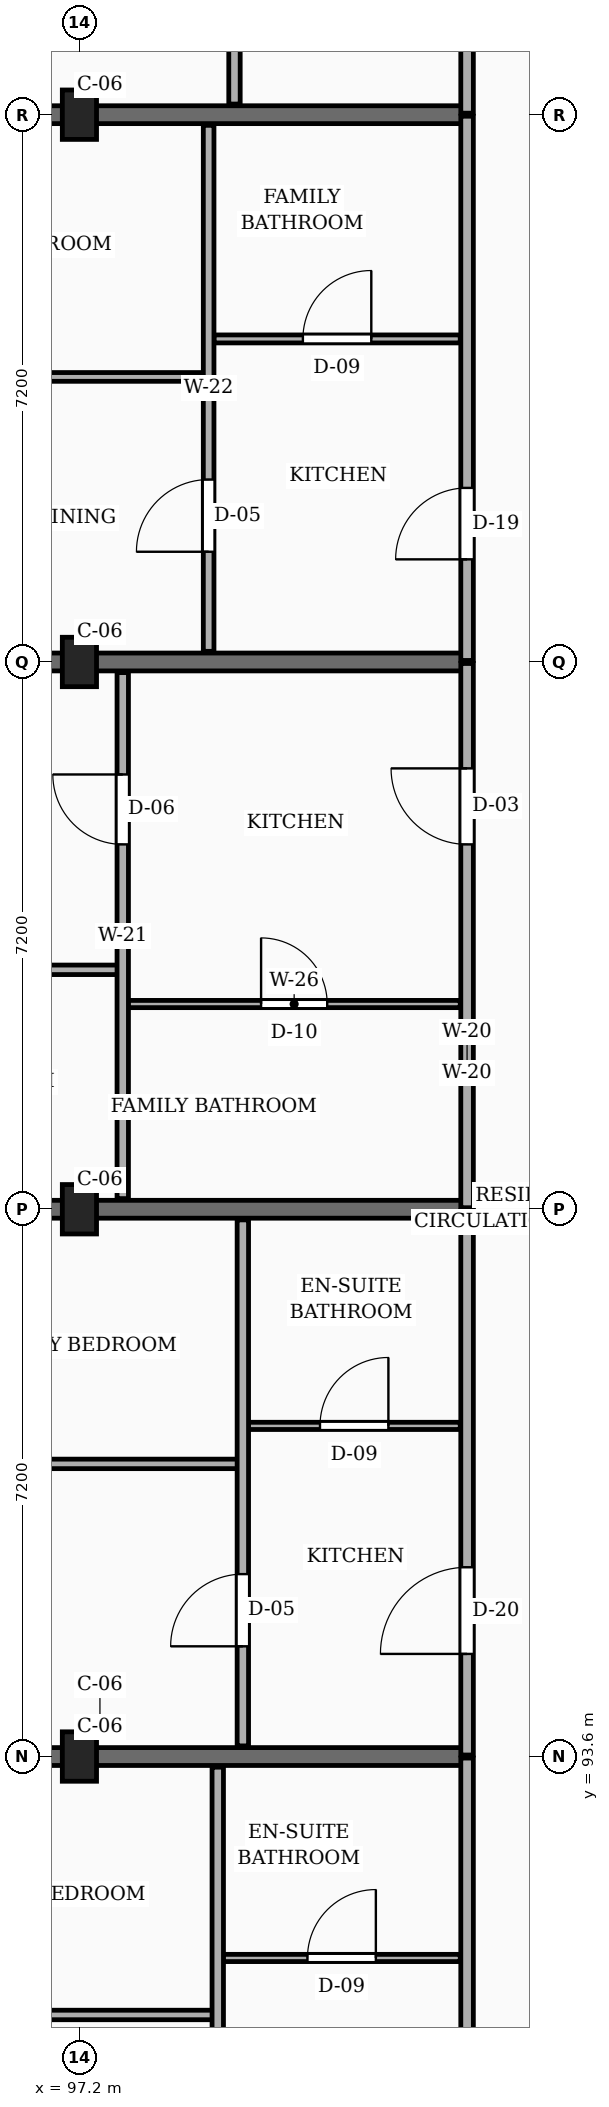
"""IFC4 building model, lengths in metres.
Left out: names, types, materials, properties, quantities, classifications, styles, units other than length and angle.
Written with IfcOpenShell. Run it as: python <this file> out.ifc"""

import sys

from ifc_helpers import new_model, si_unit, direction, frame, frame_2d, origin, origin_2d, place, context, subcontext, project, spatial, rectangle, extrude, element, fill, save


model = new_model("IFC4")
c1 = context("Model", 3, precision=1e-05, world=origin(), true_north=direction((0.0, 1.0)))
c2 = subcontext(c1, "Body", "Model", "MODEL_VIEW")
j1 = project(units=[si_unit("LENGTHUNIT", "METRE"), si_unit("PLANEANGLEUNIT", "RADIAN")], contexts=[c1])
p1 = place(None, origin())
s1 = spatial("IfcSite", under=j1, at=p1, CompositionType="ELEMENT")
p2 = place(p1, origin())
s2 = spatial("IfcBuilding", under=s1, at=p2, CompositionType="ELEMENT")
p3 = place(p2, frame((0.0, 0.0, 13.95)))
s3 = spatial("IfcBuildingStorey", under=s2, at=p3, CompositionType="ELEMENT", Elevation=13.95)
for number, where, z_axis, x_axis in (
    (1, (97.2, 93.6, 0.0), (0.0, 0.0, 1.0), (1.0, 0.0, 0.0)),
    (2, (97.2, 100.8, 0.0), (0.0, 0.0, 1.0), (1.0, 0.0, 0.0)),
    (3, (97.2, 108.0, 0.0), (0.0, 0.0, 1.0), (1.0, 0.0, 0.0)),
    (4, (97.2, 115.2, 0.0), (0.0, 0.0, 1.0), (1.0, 0.0, 0.0)),
):
    element("IfcColumn", number, at=place(p3, frame(where, z_axis=z_axis, x_axis=x_axis)), inside=s3, PredefinedType="COLUMN", context=c2, shape_type="SweptSolid", body=[
        extrude(rectangle(XDim=0.45, YDim=0.65, at=origin_2d()), origin(), (0.0, 0.0, 1.0), 3.15),
    ])
for number, where, z_axis, x_axis in (
    (5, (90.275, 93.6, 0.0), (0.0, 0.0, 1.0), (1.0, 0.0, 0.0)),
    (6, (90.275, 100.8, 0.0), (0.0, 0.0, 1.0), (1.0, 0.0, 0.0)),
    (7, (90.275, 108.0, 0.0), (0.0, 0.0, 1.0), (1.0, 0.0, 0.0)),
    (8, (90.275, 115.2, 0.0), (0.0, 0.0, 1.0), (1.0, 0.0, 0.0)),
):
    element("IfcWall", number, at=place(p3, frame(where, z_axis=z_axis, x_axis=x_axis)), inside=s3, PredefinedType="SOLIDWALL", context=c2, shape_type="SweptSolid", body=[
        extrude(rectangle(XDim=12.025, YDim=0.235, at=frame_2d((6.013, 0.0))), origin(), (0.0, 0.0, 1.0), 2.19),
    ])
p4 = place(p3, frame((102.3, 86.575, 0.0), z_axis=(0.0, 0.0, 1.0), x_axis=(0.0, 1.0, 0.0)))
e9 = element("IfcWall", 9, at=p4, inside=s3, PredefinedType="PARTITIONING", context=c2, shape_type="SweptSolid", body=[
    extrude(rectangle(XDim=7.005, YDim=0.165, at=frame_2d((3.502, 0.0))), origin(), (0.0, 0.0, 1.0), 2.325),
])
p5 = place(p4, frame((1.175, 0.0, 0.0)))
e10 = element("IfcOpeningElement", 10, at=p5, cuts=e9, PredefinedType="OPENING", context=c2, shape_type="SweptSolid", body=[
    extrude(rectangle(XDim=0.94, YDim=2.12, at=frame_2d((0.47, 1.06))), frame((0.0, 0.093, 0.0), z_axis=(0.0, -1.0, 0.0), x_axis=(1.0, 0.0, 0.0)), (0.0, 0.0, 1.0), 0.185),
])
p6 = place(p3, frame((102.3, 93.62, 0.0), z_axis=(0.0, 0.0, 1.0), x_axis=(0.0, 1.0, 0.0)))
e11 = element("IfcWall", 11, at=p6, inside=s3, PredefinedType="PARTITIONING", context=c2, shape_type="SweptSolid", body=[
    extrude(rectangle(XDim=7.16, YDim=0.165, at=frame_2d((3.58, 0.0))), origin(), (0.0, 0.0, 1.0), 2.325),
])
p7 = place(p6, frame((1.33, 0.0, 0.0)))
e12 = element("IfcOpeningElement", 12, at=p7, cuts=e11, PredefinedType="OPENING", context=c2, shape_type="SweptSolid", body=[
    extrude(rectangle(XDim=1.14, YDim=2.18, at=frame_2d((0.57, 1.09))), frame((0.0, 0.093, 0.0), z_axis=(0.0, -1.0, 0.0), x_axis=(1.0, 0.0, 0.0)), (0.0, 0.0, 1.0), 0.185),
])
p8 = place(p3, frame((102.3, 100.82, 0.0), z_axis=(0.0, 0.0, 1.0), x_axis=(0.0, 1.0, 0.0)))
e13 = element("IfcWall", 13, at=p8, inside=s3, PredefinedType="PARTITIONING", context=c2, shape_type="SweptSolid", body=[
    extrude(rectangle(XDim=7.16, YDim=0.165, at=frame_2d((3.58, 0.0))), origin(), (0.0, 0.0, 1.0), 2.325),
])
p9 = place(p8, frame((4.78, 0.0, 0.0)))
e14 = element("IfcOpeningElement", 14, at=p9, cuts=e13, PredefinedType="OPENING", context=c2, shape_type="SweptSolid", body=[
    extrude(rectangle(XDim=1.0, YDim=2.15, at=frame_2d((0.5, 1.075))), frame((0.0, 0.093, 0.0), z_axis=(0.0, -1.0, 0.0), x_axis=(1.0, 0.0, 0.0)), (0.0, 0.0, 1.0), 0.185),
])
p10 = place(p3, frame((102.3, 108.02, 0.0), z_axis=(0.0, 0.0, 1.0), x_axis=(0.0, 1.0, 0.0)))
e15 = element("IfcWall", 15, at=p10, inside=s3, PredefinedType="PARTITIONING", context=c2, shape_type="SweptSolid", body=[
    extrude(rectangle(XDim=7.16, YDim=0.165, at=frame_2d((3.58, 0.0))), origin(), (0.0, 0.0, 1.0), 2.325),
])
p11 = place(p10, frame((1.33, 0.0, 0.0)))
e16 = element("IfcOpeningElement", 16, at=p11, cuts=e15, PredefinedType="OPENING", context=c2, shape_type="SweptSolid", body=[
    extrude(rectangle(XDim=0.94, YDim=2.12, at=frame_2d((0.47, 1.06))), frame((0.0, 0.093, 0.0), z_axis=(0.0, -1.0, 0.0), x_axis=(1.0, 0.0, 0.0)), (0.0, 0.0, 1.0), 0.185),
])
p12 = place(p3, frame((102.3, 115.22, 0.0), z_axis=(0.0, 0.0, 1.0), x_axis=(0.0, 1.0, 0.0)))
e17 = element("IfcWall", 17, at=p12, inside=s3, PredefinedType="PARTITIONING", context=c2, shape_type="SweptSolid", body=[
    extrude(rectangle(XDim=7.16, YDim=0.165, at=frame_2d((3.58, 0.0))), origin(), (0.0, 0.0, 1.0), 2.325),
])
p13 = place(p12, frame((1.33, 0.0, 0.0)))
e18 = element("IfcOpeningElement", 18, at=p13, cuts=e17, PredefinedType="OPENING", context=c2, shape_type="SweptSolid", body=[
    extrude(rectangle(XDim=1.14, YDim=2.18, at=frame_2d((0.57, 1.09))), frame((0.0, 0.093, 0.0), z_axis=(0.0, -1.0, 0.0), x_axis=(1.0, 0.0, 0.0)), (0.0, 0.0, 1.0), 0.185),
])
p14 = place(p3, frame((90.175, 90.2, 0.0), z_axis=(0.0, 0.0, 1.0), x_axis=(1.0, 0.0, 0.0)))
e19 = element("IfcWall", 19, at=p14, inside=s3, PredefinedType="PARTITIONING", context=c2, shape_type="SweptSolid", body=[
    extrude(rectangle(XDim=8.775, YDim=0.125, at=frame_2d((4.387, 0.0))), origin(), (0.0, 0.0, 1.0), 2.325),
])
p15 = place(p14, frame((3.938, 0.0, 0.0)))
e20 = element("IfcOpeningElement", 20, at=p15, cuts=e19, PredefinedType="OPENING", context=c2, shape_type="SweptSolid", body=[
    extrude(rectangle(XDim=0.9, YDim=2.1, at=frame_2d((0.45, 1.05))), frame((0.0, 0.073, 0.0), z_axis=(0.0, -1.0, 0.0), x_axis=(1.0, 0.0, 0.0)), (0.0, 0.0, 1.0), 0.145),
])
p16 = place(p3, frame((99.09, 90.95, 0.0), z_axis=(0.0, 0.0, 1.0), x_axis=(1.0, 0.0, 0.0)))
e21 = element("IfcWall", 21, at=p16, inside=s3, PredefinedType="PARTITIONING", context=c2, shape_type="SweptSolid", body=[
    extrude(rectangle(XDim=3.12, YDim=0.095, at=frame_2d((1.56, 0.0))), origin(), (0.0, 0.0, 1.0), 2.325),
])
p17 = place(p16, frame((1.11, 0.0, 0.0)))
e22 = element("IfcOpeningElement", 22, at=p17, cuts=e21, PredefinedType="OPENING", context=c2, shape_type="SweptSolid", body=[
    extrude(rectangle(XDim=0.9, YDim=2.05, at=frame_2d((0.45, 1.025))), frame((0.0, 0.058, 0.0), z_axis=(0.0, -1.0, 0.0), x_axis=(1.0, 0.0, 0.0)), (0.0, 0.0, 1.0), 0.115),
])
p18 = place(p3, frame((99.02, 86.575, 0.0), z_axis=(0.0, 0.0, 1.0), x_axis=(0.0, 1.0, 0.0)))
e23 = element("IfcWall", 23, at=p18, inside=s3, PredefinedType="PARTITIONING", context=c2, shape_type="SweptSolid", body=[
    extrude(rectangle(XDim=6.885, YDim=0.15, at=frame_2d((3.442, 0.0))), origin(), (0.0, 0.0, 1.0), 2.325),
])
p19 = place(p18, frame((1.275, 0.0, 0.0)))
e24 = element("IfcOpeningElement", 24, at=p19, cuts=e23, PredefinedType="OPENING", context=c2, shape_type="SweptSolid", body=[
    extrude(rectangle(XDim=0.95, YDim=2.1, at=frame_2d((0.475, 1.05))), frame((0.0, 0.085, 0.0), z_axis=(0.0, -1.0, 0.0), x_axis=(1.0, 0.0, 0.0)), (0.0, 0.0, 1.0), 0.17),
])
p20 = place(p3, frame((90.175, 97.45, 0.0), z_axis=(0.0, 0.0, 1.0), x_axis=(1.0, 0.0, 0.0)))
e25 = element("IfcWall", 25, at=p20, inside=s3, PredefinedType="PARTITIONING", context=c2, shape_type="SweptSolid", body=[
    extrude(rectangle(XDim=9.105, YDim=0.125, at=frame_2d((4.552, 0.0))), origin(), (0.0, 0.0, 1.0), 2.325),
])
p21 = place(p20, frame((4.103, 0.0, 0.0)))
e26 = element("IfcOpeningElement", 26, at=p21, cuts=e25, PredefinedType="OPENING", context=c2, shape_type="SweptSolid", body=[
    extrude(rectangle(XDim=0.9, YDim=2.1, at=frame_2d((0.45, 1.05))), frame((0.0, 0.073, 0.0), z_axis=(0.0, -1.0, 0.0), x_axis=(1.0, 0.0, 0.0)), (0.0, 0.0, 1.0), 0.145),
])
p22 = place(p3, frame((99.42, 97.95, 0.0), z_axis=(0.0, 0.0, 1.0), x_axis=(1.0, 0.0, 0.0)))
e27 = element("IfcWall", 27, at=p22, inside=s3, PredefinedType="PARTITIONING", context=c2, shape_type="SweptSolid", body=[
    extrude(rectangle(XDim=2.79, YDim=0.095, at=frame_2d((1.395, 0.0))), origin(), (0.0, 0.0, 1.0), 2.325),
])
p23 = place(p22, frame((0.945, 0.0, 0.0)))
e28 = element("IfcOpeningElement", 28, at=p23, cuts=e27, PredefinedType="OPENING", context=c2, shape_type="SweptSolid", body=[
    extrude(rectangle(XDim=0.9, YDim=2.05, at=frame_2d((0.45, 1.025))), frame((0.0, 0.058, 0.0), z_axis=(0.0, -1.0, 0.0), x_axis=(1.0, 0.0, 0.0)), (0.0, 0.0, 1.0), 0.115),
])
p24 = place(p3, frame((99.35, 93.74, 0.0), z_axis=(0.0, 0.0, 1.0), x_axis=(0.0, 1.0, 0.0)))
e29 = element("IfcWall", 29, at=p24, inside=s3, PredefinedType="PARTITIONING", context=c2, shape_type="SweptSolid", body=[
    extrude(rectangle(XDim=6.92, YDim=0.15, at=frame_2d((3.46, 0.0))), origin(), (0.0, 0.0, 1.0), 2.325),
])
p25 = place(p24, frame((1.31, 0.0, 0.0)))
e30 = element("IfcOpeningElement", 30, at=p25, cuts=e29, PredefinedType="OPENING", context=c2, shape_type="SweptSolid", body=[
    extrude(rectangle(XDim=0.95, YDim=2.1, at=frame_2d((0.475, 1.05))), frame((0.0, 0.085, 0.0), z_axis=(0.0, -1.0, 0.0), x_axis=(1.0, 0.0, 0.0)), (0.0, 0.0, 1.0), 0.17),
])
p26 = place(p3, frame((90.175, 103.95, 0.0), z_axis=(0.0, 0.0, 1.0), x_axis=(1.0, 0.0, 0.0)))
e31 = element("IfcWall", 31, at=p26, inside=s3, PredefinedType="PARTITIONING", context=c2, shape_type="SweptSolid", body=[
    extrude(rectangle(XDim=7.525, YDim=0.125, at=frame_2d((3.762, 0.0))), origin(), (0.0, 0.0, 1.0), 2.325),
])
p27 = place(p26, frame((3.323, 0.0, 0.0)))
e32 = element("IfcOpeningElement", 32, at=p27, cuts=e31, PredefinedType="OPENING", context=c2, shape_type="SweptSolid", body=[
    extrude(rectangle(XDim=0.88, YDim=2.08, at=frame_2d((0.44, 1.04))), frame((0.0, 0.073, 0.0), z_axis=(0.0, -1.0, 0.0), x_axis=(1.0, 0.0, 0.0)), (0.0, 0.0, 1.0), 0.145),
])
p28 = place(p3, frame((97.84, 103.5, 0.0), z_axis=(0.0, 0.0, 1.0), x_axis=(1.0, 0.0, 0.0)))
e33 = element("IfcWall", 33, at=p28, inside=s3, PredefinedType="PARTITIONING", context=c2, shape_type="SweptSolid", body=[
    extrude(rectangle(XDim=4.37, YDim=0.095, at=frame_2d((2.185, 0.0))), origin(), (0.0, 0.0, 1.0), 2.325),
])
p29 = place(p28, frame((1.75, 0.0, 0.0)))
e34 = element("IfcOpeningElement", 34, at=p29, cuts=e33, PredefinedType="OPENING", context=c2, shape_type="SweptSolid", body=[
    extrude(rectangle(XDim=0.87, YDim=2.05, at=frame_2d((0.435, 1.025))), frame((0.0, 0.058, 0.0), z_axis=(0.0, -1.0, 0.0), x_axis=(1.0, 0.0, 0.0)), (0.0, 0.0, 1.0), 0.115),
])
p30 = place(p3, frame((97.77, 100.94, 0.0), z_axis=(0.0, 0.0, 1.0), x_axis=(0.0, 1.0, 0.0)))
e35 = element("IfcWall", 35, at=p30, inside=s3, PredefinedType="PARTITIONING", context=c2, shape_type="SweptSolid", body=[
    extrude(rectangle(XDim=6.92, YDim=0.15, at=frame_2d((3.46, 0.0))), origin(), (0.0, 0.0, 1.0), 2.325),
])
p31 = place(p30, frame((4.66, 0.0, 0.0)))
e36 = element("IfcOpeningElement", 36, at=p31, cuts=e35, PredefinedType="OPENING", context=c2, shape_type="SweptSolid", body=[
    extrude(rectangle(XDim=0.92, YDim=2.1, at=frame_2d((0.46, 1.05))), frame((0.0, 0.085, 0.0), z_axis=(0.0, -1.0, 0.0), x_axis=(1.0, 0.0, 0.0)), (0.0, 0.0, 1.0), 0.17),
])
p32 = place(p3, frame((90.175, 111.75, 0.0), z_axis=(0.0, 0.0, 1.0), x_axis=(1.0, 0.0, 0.0)))
e37 = element("IfcWall", 37, at=p32, inside=s3, PredefinedType="PARTITIONING", context=c2, shape_type="SweptSolid", body=[
    extrude(rectangle(XDim=8.655, YDim=0.115, at=frame_2d((4.328, 0.0))), origin(), (0.0, 0.0, 1.0), 2.325),
])
p33 = place(p32, frame((3.877, 0.0, 0.0)))
e38 = element("IfcOpeningElement", 38, at=p33, cuts=e37, PredefinedType="OPENING", context=c2, shape_type="SweptSolid", body=[
    extrude(rectangle(XDim=0.9, YDim=2.1, at=frame_2d((0.45, 1.05))), frame((0.0, 0.067, 0.0), z_axis=(0.0, -1.0, 0.0), x_axis=(1.0, 0.0, 0.0)), (0.0, 0.0, 1.0), 0.135),
])
p34 = place(p3, frame((98.97, 112.25, 0.0), z_axis=(0.0, 0.0, 1.0), x_axis=(1.0, 0.0, 0.0)))
e39 = element("IfcWall", 39, at=p34, inside=s3, PredefinedType="PARTITIONING", context=c2, shape_type="SweptSolid", body=[
    extrude(rectangle(XDim=3.24, YDim=0.105, at=frame_2d((1.62, 0.0))), origin(), (0.0, 0.0, 1.0), 2.325),
])
p35 = place(p34, frame((1.17, 0.0, 0.0)))
e40 = element("IfcOpeningElement", 40, at=p35, cuts=e39, PredefinedType="OPENING", context=c2, shape_type="SweptSolid", body=[
    extrude(rectangle(XDim=0.9, YDim=2.05, at=frame_2d((0.45, 1.025))), frame((0.0, 0.062, 0.0), z_axis=(0.0, -1.0, 0.0), x_axis=(1.0, 0.0, 0.0)), (0.0, 0.0, 1.0), 0.125),
])
p36 = place(p3, frame((98.9, 108.14, 0.0), z_axis=(0.0, 0.0, 1.0), x_axis=(0.0, 1.0, 0.0)))
e41 = element("IfcWall", 41, at=p36, inside=s3, PredefinedType="PARTITIONING", context=c2, shape_type="SweptSolid", body=[
    extrude(rectangle(XDim=6.92, YDim=0.14, at=frame_2d((3.46, 0.0))), origin(), (0.0, 0.0, 1.0), 2.325),
])
p37 = place(p36, frame((1.31, 0.0, 0.0)))
e42 = element("IfcOpeningElement", 42, at=p37, cuts=e41, PredefinedType="OPENING", context=c2, shape_type="SweptSolid", body=[
    extrude(rectangle(XDim=0.95, YDim=2.1, at=frame_2d((0.475, 1.05))), frame((0.0, 0.08, 0.0), z_axis=(0.0, -1.0, 0.0), x_axis=(1.0, 0.0, 0.0)), (0.0, 0.0, 1.0), 0.16),
])
p38 = place(p3, frame((99.24, 115.34, 0.0), z_axis=(0.0, 0.0, 1.0), x_axis=(0.0, 1.0, 0.0)))
e43 = element("IfcWall", 43, at=p38, inside=s3, PredefinedType="PARTITIONING", context=c2, shape_type="SweptSolid", body=[
    extrude(rectangle(XDim=6.92, YDim=0.15, at=frame_2d((3.46, 0.0))), origin(), (0.0, 0.0, 1.0), 2.325),
])
p39 = place(p38, frame((1.31, 0.0, 0.0)))
e44 = element("IfcOpeningElement", 44, at=p39, cuts=e43, PredefinedType="OPENING", context=c2, shape_type="SweptSolid", body=[
    extrude(rectangle(XDim=0.92, YDim=2.1, at=frame_2d((0.46, 1.05))), frame((0.0, 0.085, 0.0), z_axis=(0.0, -1.0, 0.0), x_axis=(1.0, 0.0, 0.0)), (0.0, 0.0, 1.0), 0.17),
])
p40 = place(p7, origin())
e45 = element("IfcDoor", 45, at=p40, inside=s3, OperationType="SINGLE_SWING_LEFT", PredefinedType="DOOR", context=c2, shape_type="SweptSolid", body=[
    extrude(rectangle(XDim=1.14, YDim=2.18, at=frame_2d((0.57, 1.09))), frame((0.0, 0.025, 0.0), z_axis=(0.0, -1.0, 0.0), x_axis=(1.0, 0.0, 0.0)), (0.0, 0.0, 1.0), 0.05),
])
fill(e12, e45)
p41 = place(p9, origin())
e46 = element("IfcDoor", 46, at=p41, inside=s3, OperationType="SINGLE_SWING_RIGHT", PredefinedType="DOOR", context=c2, shape_type="SweptSolid", body=[
    extrude(rectangle(XDim=1.0, YDim=2.15, at=frame_2d((0.5, 1.075))), frame((0.0, 0.025, 0.0), z_axis=(0.0, -1.0, 0.0), x_axis=(1.0, 0.0, 0.0)), (0.0, 0.0, 1.0), 0.05),
])
fill(e14, e46)
p42 = place(p11, origin())
e47 = element("IfcDoor", 47, at=p42, inside=s3, OperationType="SINGLE_SWING_LEFT", PredefinedType="DOOR", context=c2, shape_type="SweptSolid", body=[
    extrude(rectangle(XDim=0.94, YDim=2.12, at=frame_2d((0.47, 1.06))), frame((0.0, 0.025, 0.0), z_axis=(0.0, -1.0, 0.0), x_axis=(1.0, 0.0, 0.0)), (0.0, 0.0, 1.0), 0.05),
])
fill(e16, e47)
p43 = place(p17, origin())
e48 = element("IfcDoor", 48, at=p43, inside=s3, OperationType="SINGLE_SWING_RIGHT", PredefinedType="DOOR", context=c2, shape_type="SweptSolid", body=[
    extrude(rectangle(XDim=0.9, YDim=2.05, at=frame_2d((0.45, 1.025))), frame((0.0, 0.025, 0.0), z_axis=(0.0, -1.0, 0.0), x_axis=(1.0, 0.0, 0.0)), (0.0, 0.0, 1.0), 0.05),
])
fill(e22, e48)
p44 = place(p23, origin())
e49 = element("IfcDoor", 49, at=p44, inside=s3, OperationType="SINGLE_SWING_RIGHT", PredefinedType="DOOR", context=c2, shape_type="SweptSolid", body=[
    extrude(rectangle(XDim=0.9, YDim=2.05, at=frame_2d((0.45, 1.025))), frame((0.0, 0.025, 0.0), z_axis=(0.0, -1.0, 0.0), x_axis=(1.0, 0.0, 0.0)), (0.0, 0.0, 1.0), 0.05),
])
fill(e28, e49)
p45 = place(p25, origin())
e50 = element("IfcDoor", 50, at=p45, inside=s3, OperationType="SINGLE_SWING_LEFT", PredefinedType="DOOR", context=c2, shape_type="SweptSolid", body=[
    extrude(rectangle(XDim=0.95, YDim=2.1, at=frame_2d((0.475, 1.05))), frame((0.0, 0.025, 0.0), z_axis=(0.0, -1.0, 0.0), x_axis=(1.0, 0.0, 0.0)), (0.0, 0.0, 1.0), 0.05),
])
fill(e30, e50)
p46 = place(p29, origin())
e51 = element("IfcDoor", 51, at=p46, inside=s3, OperationType="SINGLE_SWING_LEFT", PredefinedType="DOOR", context=c2, shape_type="SweptSolid", body=[
    extrude(rectangle(XDim=0.87, YDim=2.05, at=frame_2d((0.435, 1.025))), frame((0.0, 0.025, 0.0), z_axis=(0.0, -1.0, 0.0), x_axis=(1.0, 0.0, 0.0)), (0.0, 0.0, 1.0), 0.05),
])
fill(e34, e51)
p47 = place(p31, origin())
e52 = element("IfcDoor", 52, at=p47, inside=s3, OperationType="SINGLE_SWING_RIGHT", PredefinedType="DOOR", context=c2, shape_type="SweptSolid", body=[
    extrude(rectangle(XDim=0.92, YDim=2.1, at=frame_2d((0.46, 1.05))), frame((0.0, 0.025, 0.0), z_axis=(0.0, -1.0, 0.0), x_axis=(1.0, 0.0, 0.0)), (0.0, 0.0, 1.0), 0.05),
])
fill(e36, e52)
p48 = place(p35, origin())
e53 = element("IfcDoor", 53, at=p48, inside=s3, OperationType="SINGLE_SWING_RIGHT", PredefinedType="DOOR", context=c2, shape_type="SweptSolid", body=[
    extrude(rectangle(XDim=0.9, YDim=2.05, at=frame_2d((0.45, 1.025))), frame((0.0, 0.025, 0.0), z_axis=(0.0, -1.0, 0.0), x_axis=(1.0, 0.0, 0.0)), (0.0, 0.0, 1.0), 0.05),
])
fill(e40, e53)
p49 = place(p37, origin())
e54 = element("IfcDoor", 54, at=p49, inside=s3, OperationType="SINGLE_SWING_LEFT", PredefinedType="DOOR", context=c2, shape_type="SweptSolid", body=[
    extrude(rectangle(XDim=0.95, YDim=2.1, at=frame_2d((0.475, 1.05))), frame((0.0, 0.025, 0.0), z_axis=(0.0, -1.0, 0.0), x_axis=(1.0, 0.0, 0.0)), (0.0, 0.0, 1.0), 0.05),
])
fill(e42, e54)
save(model, sys.argv[1])
